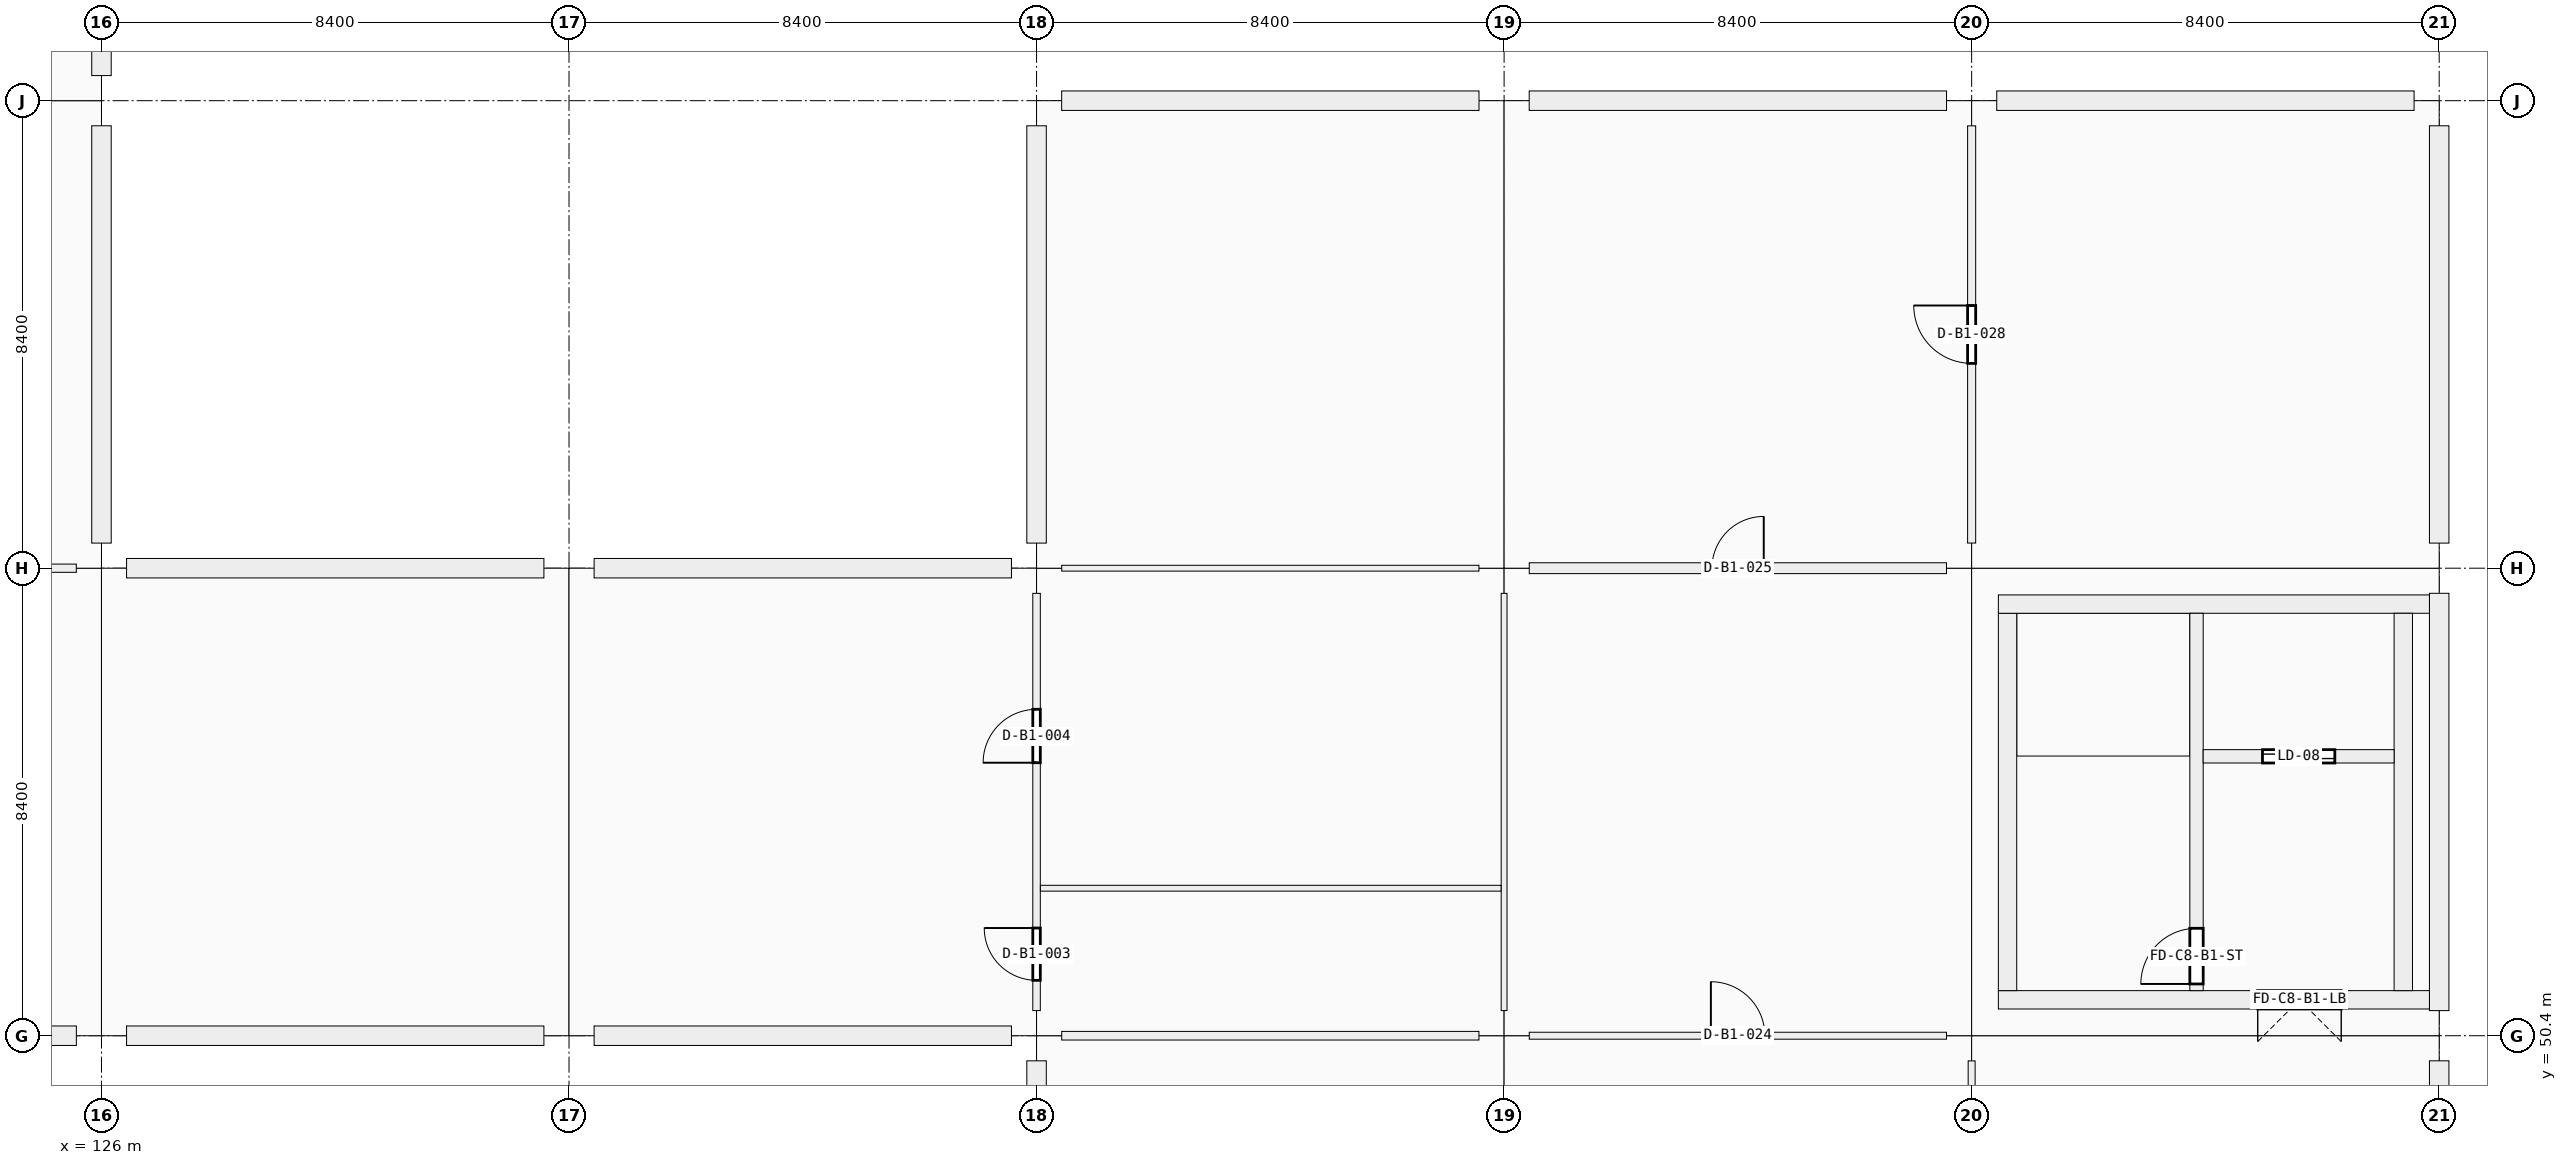
"""IFC4 building model, lengths in metres.
Left out: names, types, materials, properties, quantities, classifications, styles, units other than length and angle.
Written with IfcOpenShell. Run it as: python <this file> out.ifc"""

import sys

from ifc_helpers import new_model, si_unit, direction, frame, frame_2d, origin, origin_2d, place, context, subcontext, project, spatial, rectangle, extrude, element, fill, save


model = new_model("IFC4")
c1 = context("Model", 3, precision=1e-05, world=origin(), true_north=direction((0.0, 1.0)))
c2 = subcontext(c1, "Body", "Model", "MODEL_VIEW")
j1 = project(units=[si_unit("LENGTHUNIT", "METRE"), si_unit("PLANEANGLEUNIT", "RADIAN")], contexts=[c1])
p1 = place(None, origin())
s1 = spatial("IfcSite", under=j1, at=p1, CompositionType="ELEMENT")
p2 = place(p1, origin())
s2 = spatial("IfcBuilding", under=s1, at=p2, CompositionType="ELEMENT")
p3 = place(p2, frame((0.0, 0.0, -4.5)))
s3 = spatial("IfcBuildingStorey", under=s2, at=p3, CompositionType="ELEMENT", Elevation=-4.5)
for number, where, z_axis, x_axis in (
    (1, (126.0, 50.4, -0.35), (0.0, 0.0, 1.0), (1.0, 0.0, 0.0)),
    (2, (126.0, 58.8, -0.35), (0.0, 0.0, 1.0), (1.0, 0.0, 0.0)),
    (3, (126.0, 67.2, -0.35), (0.0, 0.0, 1.0), (1.0, 0.0, 0.0)),
    (4, (134.4, 50.4, -0.35), (0.0, 0.0, 1.0), (1.0, 0.0, 0.0)),
    (5, (134.4, 58.8, -0.35), (0.0, 0.0, 1.0), (1.0, 0.0, 0.0)),
    (6, (134.4, 67.2, -0.35), (0.0, 0.0, 1.0), (1.0, 0.0, 0.0)),
    (7, (142.8, 50.4, -0.35), (0.0, 0.0, 1.0), (1.0, 0.0, 0.0)),
    (8, (142.8, 58.8, -0.35), (0.0, 0.0, 1.0), (1.0, 0.0, 0.0)),
    (9, (142.8, 67.2, -0.35), (0.0, 0.0, 1.0), (1.0, 0.0, 0.0)),
    (10, (151.2, 50.4, -0.35), (0.0, 0.0, 1.0), (1.0, 0.0, 0.0)),
    (11, (151.2, 58.8, -0.35), (0.0, 0.0, 1.0), (1.0, 0.0, 0.0)),
    (12, (151.2, 67.2, -0.35), (0.0, 0.0, 1.0), (1.0, 0.0, 0.0)),
    (13, (159.6, 50.4, -0.35), (0.0, 0.0, 1.0), (1.0, 0.0, 0.0)),
    (14, (159.6, 58.8, -0.35), (0.0, 0.0, 1.0), (1.0, 0.0, 0.0)),
    (15, (159.6, 67.2, -0.35), (0.0, 0.0, 1.0), (1.0, 0.0, 0.0)),
    (16, (168.0, 50.4, -0.35), (0.0, 0.0, 1.0), (1.0, 0.0, 0.0)),
    (17, (168.0, 58.8, -0.35), (0.0, 0.0, 1.0), (1.0, 0.0, 0.0)),
    (18, (168.0, 67.2, -0.35), (0.0, 0.0, 1.0), (1.0, 0.0, 0.0)),
):
    element("IfcColumn", number, at=place(p3, frame(where, z_axis=z_axis, x_axis=x_axis)), inside=s3, PredefinedType="COLUMN", context=c2, shape_type="SweptSolid", body=[
        extrude(rectangle(XDim=0.9, YDim=0.9, at=origin_2d()), origin(), (0.0, 0.0, 1.0), 4.85),
    ])
for number, where, z_axis, x_axis in (
    (19, (125.549, 50.4, 0.0), (0.0, 0.0, 1.0), (-1.0, 0.0, 0.0)),
    (20, (126.0, 66.749, 0.0), (0.0, 0.0, 1.0), (0.0, -1.0, 0.0)),
    (21, (126.0, 75.149, 0.0), (0.0, 0.0, 1.0), (0.0, -1.0, 0.0)),
    (22, (133.949, 50.4, 0.0), (0.0, 0.0, 1.0), (-1.0, 0.0, 0.0)),
    (23, (126.451, 58.8, 0.0), (0.0, 0.0, 1.0), (1.0, 0.0, 0.0)),
    (24, (142.349, 50.4, 0.0), (0.0, 0.0, 1.0), (-1.0, 0.0, 0.0)),
    (25, (134.851, 58.8, 0.0), (0.0, 0.0, 1.0), (1.0, 0.0, 0.0)),
    (26, (142.8, 42.451, 0.0), (0.0, 0.0, 1.0), (0.0, 1.0, 0.0)),
    (27, (142.8, 59.251, 0.0), (0.0, 0.0, 1.0), (0.0, 1.0, 0.0)),
    (28, (143.251, 67.2, 0.0), (0.0, 0.0, 1.0), (1.0, 0.0, 0.0)),
    (29, (151.651, 67.2, 0.0), (0.0, 0.0, 1.0), (1.0, 0.0, 0.0)),
    (30, (168.0, 49.949, 0.0), (0.0, 0.0, 1.0), (0.0, -1.0, 0.0)),
    (31, (168.0, 58.349, 0.0), (0.0, 0.0, 1.0), (0.0, -1.0, 0.0)),
    (32, (160.051, 67.2, 0.0), (0.0, 0.0, 1.0), (1.0, 0.0, 0.0)),
    (33, (168.0, 66.749, 0.0), (0.0, 0.0, 1.0), (0.0, -1.0, 0.0)),
):
    element("IfcWall", number, at=place(p3, frame(where, z_axis=z_axis, x_axis=x_axis)), inside=s3, PredefinedType="SOLIDWALL", context=c2, shape_type="SweptSolid", body=[
        extrude(rectangle(XDim=7.498, YDim=0.35, at=frame_2d((3.749, 0.0))), origin(), (0.0, 0.0, 1.0), 3.35),
    ])
p4 = place(p3, frame((167.825, 51.045, -0.35), z_axis=(0.0, 0.0, 1.0), x_axis=(-1.0, 0.0, 0.0)))
e34 = element("IfcWall", 34, at=p4, inside=s3, PredefinedType="SHEAR", context=c2, shape_type="SweptSolid", body=[
    extrude(rectangle(XDim=7.745, YDim=0.33, at=frame_2d((3.873, 0.0))), origin(), (0.0, 0.0, 1.0), 4.85),
])
p5 = place(p4, frame((1.585, 0.0, 0.35)))
e35 = element("IfcOpeningElement", 35, at=p5, cuts=e34, PredefinedType="OPENING", context=c2, shape_type="SweptSolid", body=[
    extrude(rectangle(XDim=1.5, YDim=2.15, at=frame_2d((0.75, 1.075))), frame((0.0, 0.165, 0.0), z_axis=(0.0, -1.0, 0.0), x_axis=(1.0, 0.0, 0.0)), (0.0, 0.0, 1.0), 0.33),
])
p6 = place(p3, frame((160.245, 51.21, -0.35), z_axis=(0.0, 0.0, 1.0), x_axis=(0.0, 1.0, 0.0)))
e36 = element("IfcWall", 36, at=p6, inside=s3, PredefinedType="SHEAR", context=c2, shape_type="SweptSolid", body=[
    extrude(rectangle(XDim=6.78, YDim=0.33, at=frame_2d((3.39, 0.0))), origin(), (0.0, 0.0, 1.0), 4.85),
])
p7 = place(p3, frame((160.08, 58.155, -0.35), z_axis=(0.0, 0.0, 1.0), x_axis=(1.0, 0.0, 0.0)))
e37 = element("IfcWall", 37, at=p7, inside=s3, PredefinedType="SHEAR", context=c2, shape_type="SweptSolid", body=[
    extrude(rectangle(XDim=7.745, YDim=0.33, at=frame_2d((3.873, 0.0))), origin(), (0.0, 0.0, 1.0), 4.85),
])
p8 = place(p3, frame((167.355, 57.99, -0.35), z_axis=(0.0, 0.0, 1.0), x_axis=(0.0, -1.0, 0.0)))
e38 = element("IfcWall", 38, at=p8, inside=s3, PredefinedType="SHEAR", context=c2, shape_type="SweptSolid", body=[
    extrude(rectangle(XDim=6.78, YDim=0.33, at=frame_2d((3.39, 0.0))), origin(), (0.0, 0.0, 1.0), 4.85),
])
p9 = place(p3, frame((163.64, 51.21, -0.35), z_axis=(0.0, 0.0, 1.0), x_axis=(0.0, 1.0, 0.0)))
e39 = element("IfcWall", 39, at=p9, inside=s3, PredefinedType="SHEAR", context=c2, shape_type="SweptSolid", body=[
    extrude(rectangle(XDim=6.78, YDim=0.24, at=frame_2d((3.39, 0.0))), origin(), (0.0, 0.0, 1.0), 4.85),
])
p10 = place(p9, frame((0.12, 0.0, 0.35)))
e40 = element("IfcOpeningElement", 40, at=p10, cuts=e39, PredefinedType="OPENING", context=c2, shape_type="SweptSolid", body=[
    extrude(rectangle(XDim=1.0, YDim=2.15, at=frame_2d((0.5, 1.075))), frame((0.0, 0.12, 0.0), z_axis=(0.0, -1.0, 0.0), x_axis=(1.0, 0.0, 0.0)), (0.0, 0.0, 1.0), 0.24),
])
p11 = place(p3, frame((163.76, 55.42, -0.35), z_axis=(0.0, 0.0, 1.0), x_axis=(1.0, 0.0, 0.0)))
e41 = element("IfcWall", 41, at=p11, inside=s3, PredefinedType="SHEAR", context=c2, shape_type="SweptSolid", body=[
    extrude(rectangle(XDim=3.43, YDim=0.24, at=frame_2d((1.715, 0.0))), origin(), (0.0, 0.0, 1.0), 4.85),
])
p12 = place(p11, frame((1.065, 0.0, 0.35)))
e42 = element("IfcOpeningElement", 42, at=p12, cuts=e41, PredefinedType="OPENING", context=c2, shape_type="SweptSolid", body=[
    extrude(rectangle(XDim=1.3, YDim=2.25, at=frame_2d((0.65, 1.125))), frame((0.0, 0.12, 0.0), z_axis=(0.0, -1.0, 0.0), x_axis=(1.0, 0.0, 0.0)), (0.0, 0.0, 1.0), 0.24),
])
p13 = place(p3, frame((118.052, 58.8, 0.0), z_axis=(0.0, 0.0, 1.0), x_axis=(1.0, 0.0, 0.0)))
e43 = element("IfcWall", 43, at=p13, inside=s3, PredefinedType="PARTITIONING", context=c2, shape_type="SweptSolid", body=[
    extrude(rectangle(XDim=7.496, YDim=0.148, at=frame_2d((3.748, 0.0))), origin(), (0.0, 0.0, 1.0), 3.27),
])
p14 = place(p13, frame((3.298, 0.0, 0.0)))
e44 = element("IfcOpeningElement", 44, at=p14, cuts=e43, PredefinedType="OPENING", context=c2, shape_type="SweptSolid", body=[
    extrude(rectangle(XDim=0.9, YDim=2.05, at=frame_2d((0.45, 1.025))), frame((0.0, 0.074, 0.0), z_axis=(0.0, -1.0, 0.0), x_axis=(1.0, 0.0, 0.0)), (0.0, 0.0, 1.0), 0.148),
])
p15 = place(p3, frame((143.252, 50.4, 0.0), z_axis=(0.0, 0.0, 1.0), x_axis=(1.0, 0.0, 0.0)))
e45 = element("IfcWall", 45, at=p15, inside=s3, PredefinedType="PARTITIONING", context=c2, shape_type="SweptSolid", body=[
    extrude(rectangle(XDim=7.496, YDim=0.155, at=frame_2d((3.748, 0.0))), origin(), (0.0, 0.0, 1.0), 3.27),
])
p16 = place(p3, frame((143.252, 58.8, 0.0), z_axis=(0.0, 0.0, 1.0), x_axis=(1.0, 0.0, 0.0)))
e46 = element("IfcWall", 46, at=p16, inside=s3, PredefinedType="PARTITIONING", context=c2, shape_type="SweptSolid", body=[
    extrude(rectangle(XDim=7.496, YDim=0.105, at=frame_2d((3.748, 0.0))), origin(), (0.0, 0.0, 1.0), 3.27),
])
p17 = place(p3, frame((151.652, 50.4, 0.0), z_axis=(0.0, 0.0, 1.0), x_axis=(1.0, 0.0, 0.0)))
e47 = element("IfcWall", 47, at=p17, inside=s3, PredefinedType="PARTITIONING", context=c2, shape_type="SweptSolid", body=[
    extrude(rectangle(XDim=7.496, YDim=0.125, at=frame_2d((3.748, 0.0))), origin(), (0.0, 0.0, 1.0), 3.27),
])
p18 = place(p17, frame((3.263, 0.0, 0.0)))
e48 = element("IfcOpeningElement", 48, at=p18, cuts=e47, PredefinedType="OPENING", context=c2, shape_type="SweptSolid", body=[
    extrude(rectangle(XDim=0.97, YDim=2.12, at=frame_2d((0.485, 1.06))), frame((0.0, 0.062, 0.0), z_axis=(0.0, -1.0, 0.0), x_axis=(1.0, 0.0, 0.0)), (0.0, 0.0, 1.0), 0.125),
])
p19 = place(p3, frame((151.652, 58.8, 0.0), z_axis=(0.0, 0.0, 1.0), x_axis=(1.0, 0.0, 0.0)))
e49 = element("IfcWall", 49, at=p19, inside=s3, PredefinedType="PARTITIONING", context=c2, shape_type="SweptSolid", body=[
    extrude(rectangle(XDim=7.496, YDim=0.195, at=frame_2d((3.748, 0.0))), origin(), (0.0, 0.0, 1.0), 3.27),
])
p20 = place(p19, frame((3.283, 0.0, 0.0)))
e50 = element("IfcOpeningElement", 50, at=p20, cuts=e49, PredefinedType="OPENING", context=c2, shape_type="SweptSolid", body=[
    extrude(rectangle(XDim=0.93, YDim=2.12, at=frame_2d((0.465, 1.06))), frame((0.0, 0.098, 0.0), z_axis=(0.0, -1.0, 0.0), x_axis=(1.0, 0.0, 0.0)), (0.0, 0.0, 1.0), 0.195),
])
p21 = place(p3, frame((142.8, 50.852, 0.0), z_axis=(0.0, 0.0, 1.0), x_axis=(0.0, 1.0, 0.0)))
e51 = element("IfcWall", 51, at=p21, inside=s3, PredefinedType="PARTITIONING", context=c2, shape_type="SweptSolid", body=[
    extrude(rectangle(XDim=7.496, YDim=0.135, at=frame_2d((3.748, 0.0))), origin(), (0.0, 0.0, 1.0), 3.27),
])
p22 = place(p21, frame((0.543, 0.0, 0.0)))
e52 = element("IfcOpeningElement", 52, at=p22, cuts=e51, PredefinedType="OPENING", context=c2, shape_type="SweptSolid", body=[
    extrude(rectangle(XDim=0.94, YDim=2.08, at=frame_2d((0.47, 1.04))), frame((0.0, 0.067, 0.0), z_axis=(0.0, -1.0, 0.0), x_axis=(1.0, 0.0, 0.0)), (0.0, 0.0, 1.0), 0.135),
])
p23 = place(p21, frame((4.453, 0.0, 0.0)))
e53 = element("IfcOpeningElement", 53, at=p23, cuts=e51, PredefinedType="OPENING", context=c2, shape_type="SweptSolid", body=[
    extrude(rectangle(XDim=0.96, YDim=2.1, at=frame_2d((0.48, 1.05))), frame((0.0, 0.067, 0.0), z_axis=(0.0, -1.0, 0.0), x_axis=(1.0, 0.0, 0.0)), (0.0, 0.0, 1.0), 0.135),
])
p24 = place(p3, frame((151.2, 50.852, 0.0), z_axis=(0.0, 0.0, 1.0), x_axis=(0.0, 1.0, 0.0)))
e54 = element("IfcWall", 54, at=p24, inside=s3, PredefinedType="PARTITIONING", context=c2, shape_type="SweptSolid", body=[
    extrude(rectangle(XDim=7.496, YDim=0.105, at=frame_2d((3.748, 0.0))), origin(), (0.0, 0.0, 1.0), 3.27),
])
p25 = place(p3, frame((159.6, 42.452, 0.0), z_axis=(0.0, 0.0, 1.0), x_axis=(0.0, 1.0, 0.0)))
e55 = element("IfcWall", 55, at=p25, inside=s3, PredefinedType="PARTITIONING", context=c2, shape_type="SweptSolid", body=[
    extrude(rectangle(XDim=7.496, YDim=0.125, at=frame_2d((3.748, 0.0))), origin(), (0.0, 0.0, 1.0), 3.27),
])
p26 = place(p25, frame((3.278, 0.0, 0.0)))
e56 = element("IfcOpeningElement", 56, at=p26, cuts=e55, PredefinedType="OPENING", context=c2, shape_type="SweptSolid", body=[
    extrude(rectangle(XDim=0.94, YDim=2.15, at=frame_2d((0.47, 1.075))), frame((0.0, 0.062, 0.0), z_axis=(0.0, -1.0, 0.0), x_axis=(1.0, 0.0, 0.0)), (0.0, 0.0, 1.0), 0.125),
])
p27 = place(p3, frame((159.6, 59.252, 0.0), z_axis=(0.0, 0.0, 1.0), x_axis=(0.0, 1.0, 0.0)))
e57 = element("IfcWall", 57, at=p27, inside=s3, PredefinedType="PARTITIONING", context=c2, shape_type="SweptSolid", body=[
    extrude(rectangle(XDim=7.496, YDim=0.145, at=frame_2d((3.748, 0.0))), origin(), (0.0, 0.0, 1.0), 3.27),
])
p28 = place(p27, frame((3.228, 0.0, 0.0)))
e58 = element("IfcOpeningElement", 58, at=p28, cuts=e57, PredefinedType="OPENING", context=c2, shape_type="SweptSolid", body=[
    extrude(rectangle(XDim=1.04, YDim=2.2, at=frame_2d((0.52, 1.1))), frame((0.0, 0.073, 0.0), z_axis=(0.0, -1.0, 0.0), x_axis=(1.0, 0.0, 0.0)), (0.0, 0.0, 1.0), 0.145),
])
p29 = place(p3, frame((142.869, 53.05, 0.0), z_axis=(0.0, 0.0, 1.0), x_axis=(1.0, 0.0, 0.0)))
e59 = element("IfcWall", 59, at=p29, inside=s3, PredefinedType="PARTITIONING", context=c2, shape_type="SweptSolid", body=[
    extrude(rectangle(XDim=8.276, YDim=0.105, at=frame_2d((4.138, 0.0))), origin(), (0.0, 0.0, 1.0), 3.27),
])
p30 = place(p10, origin())
e60 = element("IfcDoor", 60, at=p30, inside=s3, OperationType="SINGLE_SWING_LEFT", PredefinedType="DOOR", context=c2, shape_type="SweptSolid", body=[
    extrude(rectangle(XDim=1.0, YDim=2.15, at=frame_2d((0.5, 1.075))), frame((0.0, 0.025, 0.0), z_axis=(0.0, -1.0, 0.0), x_axis=(1.0, 0.0, 0.0)), (0.0, 0.0, 1.0), 0.05),
])
fill(e40, e60)
p31 = place(p5, origin())
e61 = element("IfcDoor", 61, at=p31, inside=s3, OperationType="DOUBLE_DOOR_SINGLE_SWING", PredefinedType="DOOR", context=c2, shape_type="SweptSolid", body=[
    extrude(rectangle(XDim=1.5, YDim=2.15, at=frame_2d((0.75, 1.075))), frame((0.0, 0.025, 0.0), z_axis=(0.0, -1.0, 0.0), x_axis=(1.0, 0.0, 0.0)), (0.0, 0.0, 1.0), 0.05),
])
fill(e35, e61)
p32 = place(p12, origin())
e62 = element("IfcDoor", 62, at=p32, inside=s3, OperationType="DOUBLE_DOOR_SLIDING", PredefinedType="DOOR", context=c2, shape_type="SweptSolid", body=[
    extrude(rectangle(XDim=1.3, YDim=2.25, at=frame_2d((0.65, 1.125))), frame((0.0, 0.025, 0.0), z_axis=(0.0, -1.0, 0.0), x_axis=(1.0, 0.0, 0.0)), (0.0, 0.0, 1.0), 0.05),
])
fill(e42, e62)
p33 = place(p22, origin())
e63 = element("IfcDoor", 63, at=p33, inside=s3, OperationType="SINGLE_SWING_RIGHT", PredefinedType="DOOR", context=c2, shape_type="SweptSolid", body=[
    extrude(rectangle(XDim=0.94, YDim=2.08, at=frame_2d((0.47, 1.04))), frame((0.0, 0.025, 0.0), z_axis=(0.0, -1.0, 0.0), x_axis=(1.0, 0.0, 0.0)), (0.0, 0.0, 1.0), 0.05),
])
fill(e52, e63)
p34 = place(p23, origin())
e64 = element("IfcDoor", 64, at=p34, inside=s3, OperationType="SINGLE_SWING_LEFT", PredefinedType="DOOR", context=c2, shape_type="SweptSolid", body=[
    extrude(rectangle(XDim=0.96, YDim=2.1, at=frame_2d((0.48, 1.05))), frame((0.0, 0.025, 0.0), z_axis=(0.0, -1.0, 0.0), x_axis=(1.0, 0.0, 0.0)), (0.0, 0.0, 1.0), 0.05),
])
fill(e53, e64)
p35 = place(p18, origin())
e65 = element("IfcDoor", 65, at=p35, inside=s3, OperationType="SINGLE_SWING_LEFT", PredefinedType="DOOR", context=c2, shape_type="SweptSolid", body=[
    extrude(rectangle(XDim=0.97, YDim=2.12, at=frame_2d((0.485, 1.06))), frame((0.0, 0.025, 0.0), z_axis=(0.0, -1.0, 0.0), x_axis=(1.0, 0.0, 0.0)), (0.0, 0.0, 1.0), 0.05),
])
fill(e48, e65)
p36 = place(p20, origin())
e66 = element("IfcDoor", 66, at=p36, inside=s3, OperationType="SINGLE_SWING_RIGHT", PredefinedType="DOOR", context=c2, shape_type="SweptSolid", body=[
    extrude(rectangle(XDim=0.93, YDim=2.12, at=frame_2d((0.465, 1.06))), frame((0.0, 0.025, 0.0), z_axis=(0.0, -1.0, 0.0), x_axis=(1.0, 0.0, 0.0)), (0.0, 0.0, 1.0), 0.05),
])
fill(e50, e66)
p37 = place(p28, origin())
e67 = element("IfcDoor", 67, at=p37, inside=s3, OperationType="SINGLE_SWING_RIGHT", PredefinedType="DOOR", context=c2, shape_type="SweptSolid", body=[
    extrude(rectangle(XDim=1.04, YDim=2.2, at=frame_2d((0.52, 1.1))), frame((0.0, 0.025, 0.0), z_axis=(0.0, -1.0, 0.0), x_axis=(1.0, 0.0, 0.0)), (0.0, 0.0, 1.0), 0.05),
])
fill(e58, e67)
save(model, sys.argv[1])
